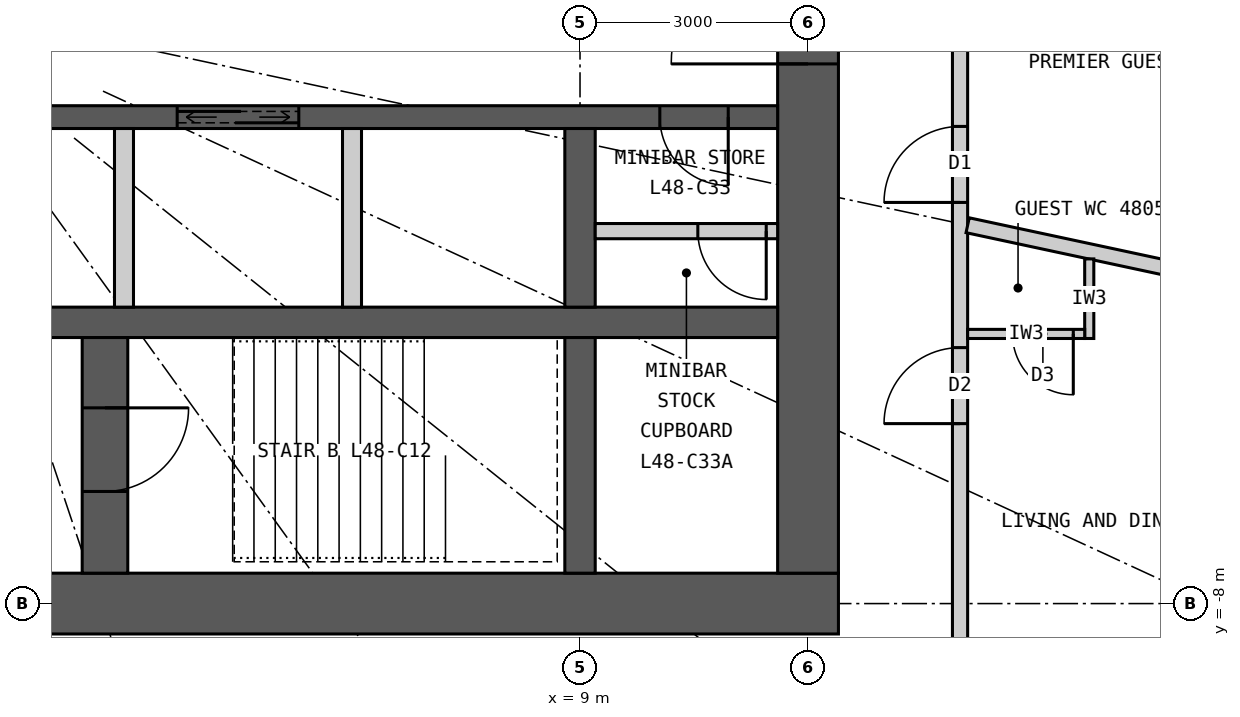
"""IFC4 building model, lengths in metres.
Left out: names, types, materials, properties, quantities, classifications, styles, units other than length and angle.
Written with IfcOpenShell. Run it as: python <this file> out.ifc"""

import sys

from ifc_helpers import new_model, si_unit, direction, frame, frame_2d, origin, place, context, subcontext, project, spatial, rectangle, extrude, element, fill, save


model = new_model("IFC4")
c1 = context("Model", 3, precision=1e-05, world=origin(), true_north=direction((0.0, 1.0)))
c2 = subcontext(c1, "Body", "Model", "MODEL_VIEW")
j1 = project(units=[si_unit("LENGTHUNIT", "METRE"), si_unit("PLANEANGLEUNIT", "RADIAN")], contexts=[c1])
p1 = place(None, origin())
s1 = spatial("IfcSite", under=j1, at=p1, CompositionType="ELEMENT")
p2 = place(p1, origin())
s2 = spatial("IfcBuilding", under=s1, at=p2, CompositionType="ELEMENT")
p3 = place(p2, frame((0.0, 0.0, 179.7)))
s3 = spatial("IfcBuildingStorey", under=s2, at=p3, CompositionType="ELEMENT", Elevation=179.7)
p4 = place(p3, frame((12.4, -8.0, 0.0), z_axis=(0.0, 0.0, 1.0), x_axis=(-1.0, 0.0, 0.0)))
e1 = element("IfcWall", 1, at=p4, inside=s3, PredefinedType="SHEAR", context=c2, shape_type="SweptSolid", body=[
    extrude(rectangle(XDim=24.8, YDim=0.8, at=frame_2d((12.4, 0.0))), origin(), (0.0, 0.0, 1.0), 3.3),
])
p5 = place(p4, frame((11.1, 0.0, 0.0)))
e2 = element("IfcOpeningElement", 2, at=p5, cuts=e1, PredefinedType="OPENING", context=c2, shape_type="SweptSolid", body=[
    extrude(rectangle(XDim=1.2, YDim=2.2, at=frame_2d((0.6, 1.1))), frame((0.0, 0.41, 0.0), z_axis=(0.0, -1.0, 0.0), x_axis=(1.0, 0.0, 0.0)), (0.0, 0.0, 1.0), 0.82),
])
p6 = place(p4, frame((18.7, 0.0, 0.0)))
e3 = element("IfcOpeningElement", 3, at=p6, cuts=e1, PredefinedType="OPENING", context=c2, shape_type="SweptSolid", body=[
    extrude(rectangle(XDim=0.9, YDim=2.2, at=frame_2d((0.45, 1.1))), frame((0.0, 0.41, 0.0), z_axis=(0.0, -1.0, 0.0), x_axis=(1.0, 0.0, 0.0)), (0.0, 0.0, 1.0), 0.82),
])
p7 = place(p3, frame((12.0, -7.6, 0.0), z_axis=(0.0, 0.0, 1.0), x_axis=(0.0, 1.0, 0.0)))
e4 = element("IfcWall", 4, at=p7, inside=s3, PredefinedType="SHEAR", context=c2, shape_type="SweptSolid", body=[
    extrude(rectangle(XDim=15.2, YDim=0.8, at=frame_2d((7.6, 0.0))), origin(), (0.0, 0.0, 1.0), 3.3),
])
p8 = place(p7, frame((6.7, 0.0, 0.0)))
e5 = element("IfcOpeningElement", 5, at=p8, cuts=e4, PredefinedType="OPENING", context=c2, shape_type="SweptSolid", body=[
    extrude(rectangle(XDim=1.8, YDim=2.2, at=frame_2d((0.9, 1.1))), frame((0.0, 0.41, 0.0), z_axis=(0.0, -1.0, 0.0), x_axis=(1.0, 0.0, 0.0)), (0.0, 0.0, 1.0), 0.82),
])
p9 = place(p3, frame((-11.6, -4.3, 0.0), z_axis=(0.0, 0.0, 1.0), x_axis=(1.0, 0.0, 0.0)))
e6 = element("IfcWall", 6, at=p9, inside=s3, PredefinedType="SHEAR", context=c2, shape_type="SweptSolid", body=[
    extrude(rectangle(XDim=23.2, YDim=0.4, at=frame_2d((11.6, 0.0))), origin(), (0.0, 0.0, 1.0), 3.3),
])
p10 = place(p3, frame((-11.6, -1.6, 0.0), z_axis=(0.0, 0.0, 1.0), x_axis=(1.0, 0.0, 0.0)))
e7 = element("IfcWall", 7, at=p10, inside=s3, PredefinedType="SHEAR", context=c2, shape_type="SweptSolid", body=[
    extrude(rectangle(XDim=23.2, YDim=0.3, at=frame_2d((11.6, 0.0))), origin(), (0.0, 0.0, 1.0), 3.3),
])
p11 = place(p10, frame((9.55, 0.0, 0.0)))
e8 = element("IfcOpeningElement", 8, at=p11, cuts=e7, PredefinedType="OPENING", context=c2, shape_type="SweptSolid", body=[
    extrude(rectangle(XDim=1.1, YDim=2.2, at=frame_2d((0.55, 1.1))), frame((0.0, 0.16, 0.0), z_axis=(0.0, -1.0, 0.0), x_axis=(1.0, 0.0, 0.0)), (0.0, 0.0, 1.0), 0.32),
])
p12 = place(p10, frame((15.3, 0.0, 0.0)))
e9 = element("IfcOpeningElement", 9, at=p12, cuts=e7, PredefinedType="OPENING", context=c2, shape_type="SweptSolid", body=[
    extrude(rectangle(XDim=1.6, YDim=2.4, at=frame_2d((0.8, 1.2))), frame((0.0, 0.16, 0.0), z_axis=(0.0, -1.0, 0.0), x_axis=(1.0, 0.0, 0.0)), (0.0, 0.0, 1.0), 0.32),
])
p13 = place(p10, frame((0.65, 0.0, 0.0)))
e10 = element("IfcOpeningElement", 10, at=p13, cuts=e7, PredefinedType="OPENING", context=c2, shape_type="SweptSolid", body=[
    extrude(rectangle(XDim=0.9, YDim=2.2, at=frame_2d((0.45, 1.1))), frame((0.0, 0.16, 0.0), z_axis=(0.0, -1.0, 0.0), x_axis=(1.0, 0.0, 0.0)), (0.0, 0.0, 1.0), 0.32),
])
p14 = place(p10, frame((5.15, 0.0, 0.0)))
e11 = element("IfcOpeningElement", 11, at=p14, cuts=e7, PredefinedType="OPENING", context=c2, shape_type="SweptSolid", body=[
    extrude(rectangle(XDim=0.9, YDim=2.2, at=frame_2d((0.45, 1.1))), frame((0.0, 0.16, 0.0), z_axis=(0.0, -1.0, 0.0), x_axis=(1.0, 0.0, 0.0)), (0.0, 0.0, 1.0), 0.32),
])
p15 = place(p10, frame((21.65, 0.0, 0.0)))
e12 = element("IfcOpeningElement", 12, at=p15, cuts=e7, PredefinedType="OPENING", context=c2, shape_type="SweptSolid", body=[
    extrude(rectangle(XDim=0.9, YDim=2.2, at=frame_2d((0.45, 1.1))), frame((0.0, 0.16, 0.0), z_axis=(0.0, -1.0, 0.0), x_axis=(1.0, 0.0, 0.0)), (0.0, 0.0, 1.0), 0.32),
])
p16 = place(p3, frame((9.0, -4.1, 0.0), z_axis=(0.0, 0.0, 1.0), x_axis=(0.0, 1.0, 0.0)))
e13 = element("IfcWall", 13, at=p16, inside=s3, PredefinedType="SHEAR", context=c2, shape_type="SweptSolid", body=[
    extrude(rectangle(XDim=2.35, YDim=0.4, at=frame_2d((1.175, 0.0))), origin(), (0.0, 0.0, 1.0), 3.3),
])
p17 = place(p3, frame((9.0, -7.6, 0.0), z_axis=(0.0, 0.0, 1.0), x_axis=(0.0, 1.0, 0.0)))
e14 = element("IfcWall", 14, at=p17, inside=s3, PredefinedType="SHEAR", context=c2, shape_type="SweptSolid", body=[
    extrude(rectangle(XDim=3.1, YDim=0.4, at=frame_2d((1.55, 0.0))), origin(), (0.0, 0.0, 1.0), 3.3),
])
p18 = place(p3, frame((2.75, -7.6, 0.0), z_axis=(0.0, 0.0, 1.0), x_axis=(0.0, 1.0, 0.0)))
e15 = element("IfcWall", 15, at=p18, inside=s3, PredefinedType="SHEAR", context=c2, shape_type="SweptSolid", body=[
    extrude(rectangle(XDim=3.1, YDim=0.6, at=frame_2d((1.55, 0.0))), origin(), (0.0, 0.0, 1.0), 3.3),
])
p19 = place(p18, frame((1.075, 0.0, 0.0)))
e16 = element("IfcOpeningElement", 16, at=p19, cuts=e15, PredefinedType="OPENING", context=c2, shape_type="SweptSolid", body=[
    extrude(rectangle(XDim=1.1, YDim=2.2, at=frame_2d((0.55, 1.1))), frame((0.0, 0.31, 0.0), z_axis=(0.0, -1.0, 0.0), x_axis=(1.0, 0.0, 0.0)), (0.0, 0.0, 1.0), 0.62),
])
for number, where, z_axis, x_axis in (
    (17, (3.0, -4.1, 0.0), (0.0, 0.0, 1.0), (0.0, 1.0, 0.0)),
    (18, (6.0, -4.1, 0.0), (0.0, 0.0, 1.0), (0.0, 1.0, 0.0)),
):
    element("IfcWall", number, at=place(p3, frame(where, z_axis=z_axis, x_axis=x_axis)), inside=s3, PredefinedType="PARTITIONING", context=c2, shape_type="SweptSolid", body=[
        extrude(rectangle(XDim=2.35, YDim=0.25, at=frame_2d((1.175, 0.0))), origin(), (0.0, 0.0, 1.0), 3.3),
    ])
p20 = place(p3, frame((14.0, -9.9, 0.0), z_axis=(0.0, 0.0, 1.0), x_axis=(0.0, 1.0, 0.0)))
e19 = element("IfcWall", 19, at=p20, inside=s3, PredefinedType="PARTITIONING", context=c2, shape_type="SweptSolid", body=[
    extrude(rectangle(XDim=19.8, YDim=0.2, at=frame_2d((9.9, 0.0))), origin(), (0.0, 0.0, 1.0), 3.12),
])
p21 = place(p20, frame((4.268, 0.0, 0.0)))
e20 = element("IfcOpeningElement", 20, at=p21, cuts=e19, PredefinedType="OPENING", context=c2, shape_type="SweptSolid", body=[
    extrude(rectangle(XDim=1.0, YDim=2.2, at=frame_2d((0.5, 1.1))), frame((0.0, 0.11, 0.0), z_axis=(0.0, -1.0, 0.0), x_axis=(1.0, 0.0, 0.0)), (0.0, 0.0, 1.0), 0.22),
])
p22 = place(p20, frame((7.177, 0.0, 0.0)))
e21 = element("IfcOpeningElement", 21, at=p22, cuts=e19, PredefinedType="OPENING", context=c2, shape_type="SweptSolid", body=[
    extrude(rectangle(XDim=1.0, YDim=2.2, at=frame_2d((0.5, 1.1))), frame((0.0, 0.11, 0.0), z_axis=(0.0, -1.0, 0.0), x_axis=(1.0, 0.0, 0.0)), (0.0, 0.0, 1.0), 0.22),
])
p23 = place(p20, frame((17.701, 0.0, 0.0)))
e22 = element("IfcOpeningElement", 22, at=p23, cuts=e19, PredefinedType="OPENING", context=c2, shape_type="SweptSolid", body=[
    extrude(rectangle(XDim=1.0, YDim=2.2, at=frame_2d((0.5, 1.1))), frame((0.0, 0.11, 0.0), z_axis=(0.0, -1.0, 0.0), x_axis=(1.0, 0.0, 0.0)), (0.0, 0.0, 1.0), 0.22),
])
p24 = place(p3, frame((14.1, -3.022, 0.0), z_axis=(0.0, 0.0, 1.0), x_axis=(0.977790639684, -0.209584028367, 0.0)))
e23 = element("IfcWall", 23, at=p24, inside=s3, PredefinedType="PARTITIONING", context=c2, shape_type="SweptSolid", body=[
    extrude(rectangle(XDim=6.98, YDim=0.2, at=frame_2d((3.49, 0.0))), origin(), (0.0, 0.0, 1.0), 2.27),
])
p25 = place(p3, frame((15.7, -3.465, 0.0), z_axis=(0.0, 0.0, 1.0), x_axis=(0.0, -1.0, 0.0)))
e24 = element("IfcWall", 24, at=p25, inside=s3, PredefinedType="PARTITIONING", context=c2, shape_type="SweptSolid", body=[
    extrude(rectangle(XDim=1.047, YDim=0.12, at=frame_2d((0.523, 0.0))), origin(), (0.0, 0.0, 1.0), 3.12),
])
p26 = place(p3, frame((14.1, -4.452, 0.0), z_axis=(0.0, 0.0, 1.0), x_axis=(1.0, 0.0, 0.0)))
e25 = element("IfcWall", 25, at=p26, inside=s3, PredefinedType="PARTITIONING", context=c2, shape_type="SweptSolid", body=[
    extrude(rectangle(XDim=1.54, YDim=0.12, at=frame_2d((0.77, 0.0))), origin(), (0.0, 0.0, 1.0), 3.12),
])
p27 = place(p26, frame((0.59, 0.0, 0.0)))
e26 = element("IfcOpeningElement", 26, at=p27, cuts=e25, PredefinedType="OPENING", context=c2, shape_type="SweptSolid", body=[
    extrude(rectangle(XDim=0.8, YDim=2.1, at=frame_2d((0.4, 1.05))), frame((0.0, 0.07, 0.0), z_axis=(0.0, -1.0, 0.0), x_axis=(1.0, 0.0, 0.0)), (0.0, 0.0, 1.0), 0.14),
])
p28 = place(p3, frame((9.2, -3.1, 0.0), z_axis=(0.0, 0.0, 1.0), x_axis=(1.0, 0.0, 0.0)))
e27 = element("IfcWall", 27, at=p28, inside=s3, PredefinedType="PARTITIONING", context=c2, shape_type="SweptSolid", body=[
    extrude(rectangle(XDim=2.4, YDim=0.2, at=frame_2d((1.2, 0.0))), origin(), (0.0, 0.0, 1.0), 3.12),
])
p29 = place(p28, frame((1.35, 0.0, 0.0)))
e28 = element("IfcOpeningElement", 28, at=p29, cuts=e27, PredefinedType="OPENING", context=c2, shape_type="SweptSolid", body=[
    extrude(rectangle(XDim=0.9, YDim=2.2, at=frame_2d((0.45, 1.1))), frame((0.0, 0.11, 0.0), z_axis=(0.0, -1.0, 0.0), x_axis=(1.0, 0.0, 0.0)), (0.0, 0.0, 1.0), 0.22),
])
p30 = place(p27, origin())
e29 = element("IfcDoor", 29, at=p30, inside=s3, OperationType="SINGLE_SWING_RIGHT", PredefinedType="DOOR", context=c2, shape_type="SweptSolid", body=[
    extrude(rectangle(XDim=0.8, YDim=2.1, at=frame_2d((0.4, 1.05))), frame((0.0, 0.025, 0.0), z_axis=(0.0, -1.0, 0.0), x_axis=(1.0, 0.0, 0.0)), (0.0, 0.0, 1.0), 0.05),
])
fill(e26, e29)
p31 = place(p21, origin())
e30 = element("IfcDoor", 30, at=p31, inside=s3, OperationType="SINGLE_SWING_LEFT", PredefinedType="DOOR", context=c2, shape_type="SweptSolid", body=[
    extrude(rectangle(XDim=1.0, YDim=2.2, at=frame_2d((0.5, 1.1))), frame((0.0, 0.025, 0.0), z_axis=(0.0, -1.0, 0.0), x_axis=(1.0, 0.0, 0.0)), (0.0, 0.0, 1.0), 0.05),
])
fill(e20, e30)
p32 = place(p22, origin())
e31 = element("IfcDoor", 31, at=p32, inside=s3, OperationType="SINGLE_SWING_LEFT", PredefinedType="DOOR", context=c2, shape_type="SweptSolid", body=[
    extrude(rectangle(XDim=1.0, YDim=2.2, at=frame_2d((0.5, 1.1))), frame((0.0, 0.025, 0.0), z_axis=(0.0, -1.0, 0.0), x_axis=(1.0, 0.0, 0.0)), (0.0, 0.0, 1.0), 0.05),
])
fill(e21, e31)
p33 = place(p19, origin())
e32 = element("IfcDoor", 32, at=p33, inside=s3, OperationType="SINGLE_SWING_RIGHT", PredefinedType="DOOR", context=c2, shape_type="SweptSolid", body=[
    extrude(rectangle(XDim=1.1, YDim=2.2, at=frame_2d((0.55, 1.1))), frame((0.0, 0.025, 0.0), z_axis=(0.0, -1.0, 0.0), x_axis=(1.0, 0.0, 0.0)), (0.0, 0.0, 1.0), 0.05),
])
fill(e16, e32)
p34 = place(p12, origin())
e33 = element("IfcDoor", 33, at=p34, inside=s3, OperationType="DOUBLE_DOOR_SLIDING", PredefinedType="DOOR", context=c2, shape_type="SweptSolid", body=[
    extrude(rectangle(XDim=1.6, YDim=2.4, at=frame_2d((0.8, 1.2))), frame((0.0, 0.025, 0.0), z_axis=(0.0, -1.0, 0.0), x_axis=(1.0, 0.0, 0.0)), (0.0, 0.0, 1.0), 0.05),
])
fill(e9, e33)
p35 = place(p29, origin())
e34 = element("IfcDoor", 34, at=p35, inside=s3, OperationType="SINGLE_SWING_RIGHT", PredefinedType="DOOR", context=c2, shape_type="SweptSolid", body=[
    extrude(rectangle(XDim=0.9, YDim=2.2, at=frame_2d((0.45, 1.1))), frame((0.0, 0.025, 0.0), z_axis=(0.0, -1.0, 0.0), x_axis=(1.0, 0.0, 0.0)), (0.0, 0.0, 1.0), 0.05),
])
fill(e28, e34)
p36 = place(p15, origin())
e35 = element("IfcDoor", 35, at=p36, inside=s3, OperationType="SINGLE_SWING_RIGHT", PredefinedType="DOOR", context=c2, shape_type="SweptSolid", body=[
    extrude(rectangle(XDim=0.9, YDim=2.2, at=frame_2d((0.45, 1.1))), frame((0.0, 0.025, 0.0), z_axis=(0.0, -1.0, 0.0), x_axis=(1.0, 0.0, 0.0)), (0.0, 0.0, 1.0), 0.05),
])
fill(e12, e35)
p37 = place(p8, origin())
e36 = element("IfcDoor", 36, at=p37, inside=s3, OperationType="DOUBLE_DOOR_DOUBLE_SWING", PredefinedType="DOOR", context=c2, shape_type="SweptSolid", body=[
    extrude(rectangle(XDim=1.8, YDim=2.2, at=frame_2d((0.9, 1.1))), frame((0.0, 0.025, 0.0), z_axis=(0.0, -1.0, 0.0), x_axis=(1.0, 0.0, 0.0)), (0.0, 0.0, 1.0), 0.05),
])
fill(e5, e36)
save(model, sys.argv[1])
